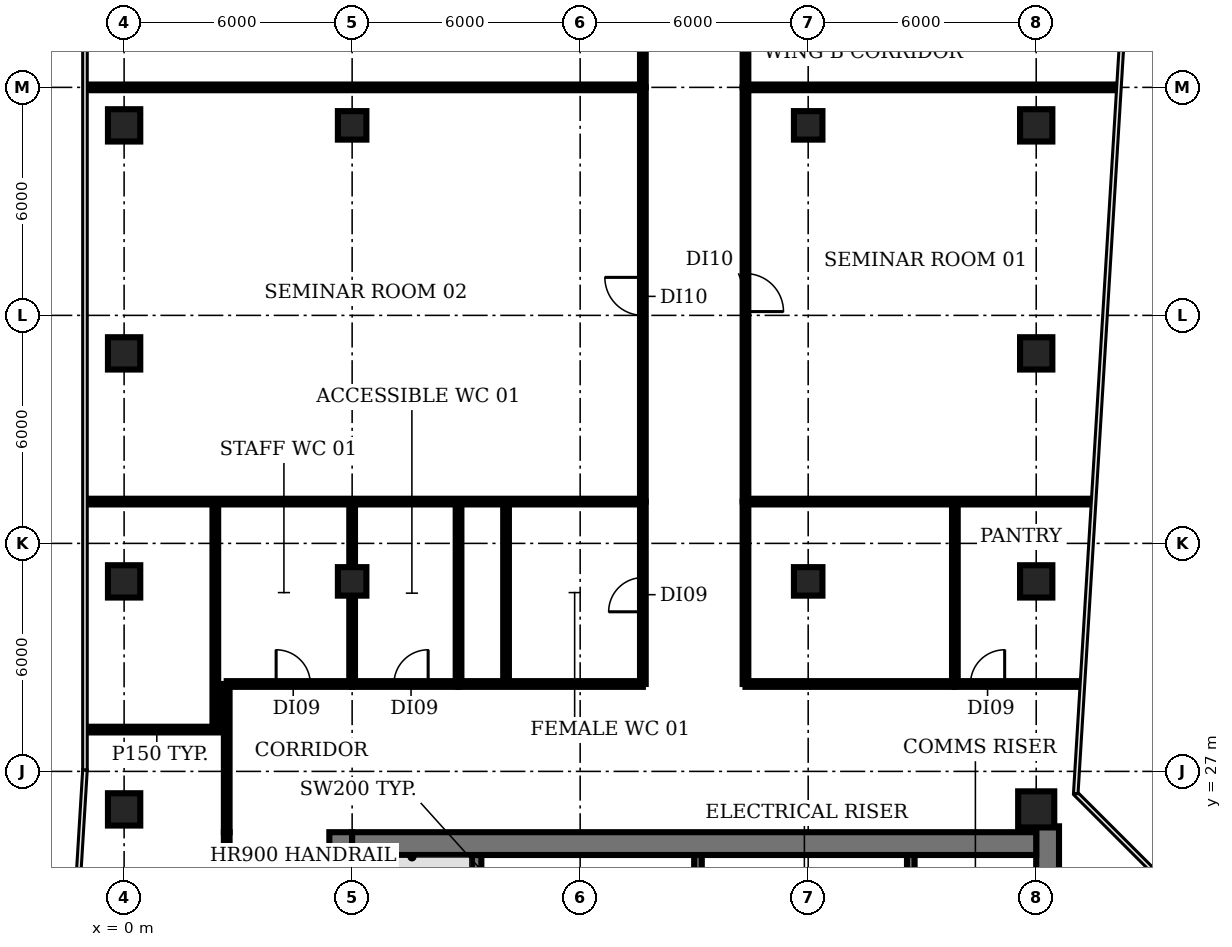
"""IFC4 building model, lengths in metres.
Left out: names, types, materials, properties, quantities, classifications, styles, units other than length and angle.
Written with IfcOpenShell. Run it as: python <this file> out.ifc"""

import sys

from ifc_helpers import new_model, si_unit, direction, frame, frame_2d, origin, origin_2d, place, context, subcontext, project, spatial, rectangle, circle, extrude, element, fill, save


model = new_model("IFC4")
c1 = context("Model", 3, precision=1e-05, world=origin(), true_north=direction((0.0, 1.0)))
c2 = subcontext(c1, "Body", "Model", "MODEL_VIEW")
j1 = project(units=[si_unit("LENGTHUNIT", "METRE"), si_unit("PLANEANGLEUNIT", "RADIAN")], contexts=[c1])
p1 = place(None, origin())
s1 = spatial("IfcSite", under=j1, at=p1, CompositionType="ELEMENT")
p2 = place(p1, origin())
s2 = spatial("IfcBuilding", under=s1, at=p2, CompositionType="ELEMENT")
p3 = place(p2, frame((0.0, 0.0, 155.0)))
s3 = spatial("IfcBuildingStorey", under=s2, at=p3, CompositionType="ELEMENT", Elevation=155.0)
for number, where, z_axis, x_axis in (
    (1, (0.0, 26.0, 0.0), (0.0, 0.0, 1.0), (1.0, 0.0, 0.0)),
    (2, (0.0, 32.0, 0.0), (0.0, 0.0, 1.0), (1.0, 0.0, 0.0)),
    (3, (0.0, 38.0, 0.0), (0.0, 0.0, 1.0), (1.0, 0.0, 0.0)),
    (4, (0.0, 44.0, 0.0), (0.0, 0.0, 1.0), (1.0, 0.0, 0.0)),
):
    element("IfcColumn", number, at=place(p3, frame(where, z_axis=z_axis, x_axis=x_axis)), inside=s3, PredefinedType="COLUMN", context=c2, shape_type="SweptSolid", body=[
        extrude(rectangle(XDim=0.85, YDim=0.85, at=origin_2d()), origin(), (0.0, 0.0, 1.0), 3.85),
    ])
for number, where, z_axis, x_axis in (
    (5, (6.0, 32.0, 0.0), (0.0, 0.0, 1.0), (1.0, 0.0, 0.0)),
    (6, (6.0, 44.0, 0.0), (0.0, 0.0, 1.0), (1.0, 0.0, 0.0)),
    (7, (18.0, 32.0, 0.0), (0.0, 0.0, 1.0), (1.0, 0.0, 0.0)),
    (8, (18.0, 44.0, 0.0), (0.0, 0.0, 1.0), (1.0, 0.0, 0.0)),
):
    element("IfcColumn", number, at=place(p3, frame(where, z_axis=z_axis, x_axis=x_axis)), inside=s3, PredefinedType="COLUMN", context=c2, shape_type="SweptSolid", body=[
        extrude(rectangle(XDim=0.75, YDim=0.75, at=origin_2d()), origin(), (0.0, 0.0, 1.0), 3.85),
    ])
p4 = place(p3, frame((24.0, 26.0, 0.0), z_axis=(0.0, 0.0, 1.0), x_axis=(1.0, 0.0, 0.0)))
e9 = element("IfcColumn", 9, at=p4, inside=s3, PredefinedType="COLUMN", context=c2, shape_type="SweptSolid", body=[
    extrude(circle(Radius=0.475, at=origin_2d()), origin(), (0.0, 0.0, 1.0), 3.85),
])
for number, where, z_axis, x_axis in (
    (10, (24.0, 32.0, 0.0), (0.0, 0.0, 1.0), (1.0, 0.0, 0.0)),
    (11, (24.0, 38.0, 0.0), (0.0, 0.0, 1.0), (1.0, 0.0, 0.0)),
    (12, (24.0, 44.0, 0.0), (0.0, 0.0, 1.0), (1.0, 0.0, 0.0)),
):
    element("IfcColumn", number, at=place(p3, frame(where, z_axis=z_axis, x_axis=x_axis)), inside=s3, PredefinedType="COLUMN", context=c2, shape_type="SweptSolid", body=[
        extrude(rectangle(XDim=0.85, YDim=0.85, at=origin_2d()), origin(), (0.0, 0.0, 1.0), 3.85),
    ])
p5 = place(p3, frame((9.275, 18.375, 0.0), z_axis=(0.0, 0.0, 1.0), x_axis=(0.0, 1.0, 0.0)))
e13 = element("IfcWall", 13, at=p5, inside=s3, PredefinedType="SHEAR", context=c2, shape_type="SweptSolid", body=[
    extrude(rectangle(XDim=6.425, YDim=0.25, at=frame_2d((3.212, 0.0))), origin(), (0.0, 0.0, 1.0), 3.85),
])
for number, where, z_axis, x_axis in (
    (14, (15.1, 22.9, 0.0), (0.0, 0.0, 1.0), (0.0, 1.0, 0.0)),
    (15, (20.7, 22.9, 0.0), (0.0, 0.0, 1.0), (0.0, 1.0, 0.0)),
):
    element("IfcWall", number, at=place(p3, frame(where, z_axis=z_axis, x_axis=x_axis)), inside=s3, PredefinedType="SHEAR", context=c2, shape_type="SweptSolid", body=[
        extrude(rectangle(XDim=1.9, YDim=0.2, at=frame_2d((0.95, 0.0))), origin(), (0.0, 0.0, 1.0), 3.85),
    ])
p6 = place(p3, frame((5.7, 4.8, 0.0), z_axis=(0.0, 0.0, 1.0), x_axis=(0.0, 1.0, 0.0)))
e16 = element("IfcWall", 16, at=p6, inside=s3, PredefinedType="SHEAR", context=c2, shape_type="SweptSolid", body=[
    extrude(rectangle(XDim=20.6, YDim=0.6, at=frame_2d((10.3, 0.0))), origin(), (0.0, 0.0, 1.0), 3.85),
])
p7 = place(p6, frame((0.85, 0.0, 0.0)))
e17 = element("IfcOpeningElement", 17, at=p7, cuts=e16, PredefinedType="OPENING", context=c2, shape_type="SweptSolid", body=[
    extrude(rectangle(XDim=1.5, YDim=2.1, at=frame_2d((0.75, 1.05))), frame((0.0, 0.31, 0.0), z_axis=(0.0, -1.0, 0.0), x_axis=(1.0, 0.0, 0.0)), (0.0, 0.0, 1.0), 0.62),
])
p8 = place(p6, frame((7.3, 0.0, 0.0)))
e18 = element("IfcOpeningElement", 18, at=p8, cuts=e16, PredefinedType="OPENING", context=c2, shape_type="SweptSolid", body=[
    extrude(rectangle(XDim=1.2, YDim=2.1, at=frame_2d((0.6, 1.05))), frame((0.0, 0.31, 0.0), z_axis=(0.0, -1.0, 0.0), x_axis=(1.0, 0.0, 0.0)), (0.0, 0.0, 1.0), 0.62),
])
p9 = place(p6, frame((13.85, 0.0, 0.0)))
e19 = element("IfcOpeningElement", 19, at=p9, cuts=e16, PredefinedType="OPENING", context=c2, shape_type="SweptSolid", body=[
    extrude(rectangle(XDim=1.2, YDim=2.1, at=frame_2d((0.6, 1.05))), frame((0.0, 0.31, 0.0), z_axis=(0.0, -1.0, 0.0), x_axis=(1.0, 0.0, 0.0)), (0.0, 0.0, 1.0), 0.62),
])
p10 = place(p3, frame((24.3, 25.555, 0.0), z_axis=(0.0, 0.0, 1.0), x_axis=(0.0, -1.0, 0.0)))
e20 = element("IfcWall", 20, at=p10, inside=s3, PredefinedType="SHEAR", context=c2, shape_type="SweptSolid", body=[
    extrude(rectangle(XDim=20.755, YDim=0.6, at=frame_2d((10.377, 0.0))), origin(), (0.0, 0.0, 1.0), 3.85),
])
p11 = place(p10, frame((18.405, 0.0, 0.0)))
e21 = element("IfcOpeningElement", 21, at=p11, cuts=e20, PredefinedType="OPENING", context=c2, shape_type="SweptSolid", body=[
    extrude(rectangle(XDim=1.5, YDim=2.1, at=frame_2d((0.75, 1.05))), frame((0.0, 0.31, 0.0), z_axis=(0.0, -1.0, 0.0), x_axis=(1.0, 0.0, 0.0)), (0.0, 0.0, 1.0), 0.62),
])
p12 = place(p10, frame((12.305, 0.0, 0.0)))
e22 = element("IfcOpeningElement", 22, at=p12, cuts=e20, PredefinedType="OPENING", context=c2, shape_type="SweptSolid", body=[
    extrude(rectangle(XDim=0.9, YDim=2.1, at=frame_2d((0.45, 1.05))), frame((0.0, 0.31, 0.0), z_axis=(0.0, -1.0, 0.0), x_axis=(1.0, 0.0, 0.0)), (0.0, 0.0, 1.0), 0.62),
])
p13 = place(p10, frame((6.305, 0.0, 0.0)))
e23 = element("IfcOpeningElement", 23, at=p13, cuts=e20, PredefinedType="OPENING", context=c2, shape_type="SweptSolid", body=[
    extrude(rectangle(XDim=2.0, YDim=2.1, at=frame_2d((1.0, 1.05))), frame((0.0, 0.31, 0.0), z_axis=(0.0, -1.0, 0.0), x_axis=(1.0, 0.0, 0.0)), (0.0, 0.0, 1.0), 0.62),
])
p14 = place(p3, frame((6.0, 25.1, 0.0), z_axis=(0.0, 0.0, 1.0), x_axis=(1.0, 0.0, 0.0)))
e24 = element("IfcWall", 24, at=p14, inside=s3, PredefinedType="SHEAR", context=c2, shape_type="SweptSolid", body=[
    extrude(rectangle(XDim=18.0, YDim=0.6, at=frame_2d((9.0, 0.0))), origin(), (0.0, 0.0, 1.0), 3.85),
])
p15 = place(p3, frame((-0.98, 28.1, 0.0), z_axis=(0.0, 0.0, 1.0), x_axis=(1.0, 0.0, 0.0)))
e25 = element("IfcWall", 25, at=p15, inside=s3, PredefinedType="PARTITIONING", context=c2, shape_type="SweptSolid", body=[
    extrude(rectangle(XDim=3.68, YDim=0.15, at=frame_2d((1.84, 0.0))), origin(), (0.0, 0.0, 1.0), 2.88),
])
p16 = place(p3, frame((-0.98, 34.1, 0.0), z_axis=(0.0, 0.0, 1.0), x_axis=(1.0, 0.0, 0.0)))
e26 = element("IfcWall", 26, at=p16, inside=s3, PredefinedType="PARTITIONING", context=c2, shape_type="SweptSolid", body=[
    extrude(rectangle(XDim=14.63, YDim=0.15, at=frame_2d((7.315, 0.0))), origin(), (0.0, 0.0, 1.0), 2.88),
])
p17 = place(p3, frame((-0.965, 45.0, 0.0), z_axis=(0.0, 0.0, 1.0), x_axis=(1.0, 0.0, 0.0)))
e27 = element("IfcWall", 27, at=p17, inside=s3, PredefinedType="PARTITIONING", context=c2, shape_type="SweptSolid", body=[
    extrude(rectangle(XDim=14.615, YDim=0.15, at=frame_2d((7.308, 0.0))), origin(), (0.0, 0.0, 1.0), 2.88),
])
p18 = place(p3, frame((2.4, 28.1, 0.0), z_axis=(0.0, 0.0, 1.0), x_axis=(0.0, 1.0, 0.0)))
e28 = element("IfcWall", 28, at=p18, inside=s3, PredefinedType="PARTITIONING", context=c2, shape_type="SweptSolid", body=[
    extrude(rectangle(XDim=6.0, YDim=0.15, at=frame_2d((3.0, 0.0))), origin(), (0.0, 0.0, 1.0), 2.88),
])
p19 = place(p3, frame((2.7, 4.8, 0.0), z_axis=(0.0, 0.0, 1.0), x_axis=(0.0, 1.0, 0.0)))
e29 = element("IfcWall", 29, at=p19, inside=s3, PredefinedType="PARTITIONING", context=c2, shape_type="SweptSolid", body=[
    extrude(rectangle(XDim=20.6, YDim=0.15, at=frame_2d((10.3, 0.0))), origin(), (0.0, 0.0, 1.0), 2.88),
])
p20 = place(p19, frame((10.2, 0.0, 0.0)))
e30 = element("IfcOpeningElement", 30, at=p20, cuts=e29, PredefinedType="OPENING", context=c2, shape_type="SweptSolid", body=[
    extrude(rectangle(XDim=1.2, YDim=2.1, at=frame_2d((0.6, 1.05))), frame((0.0, 0.085, 0.0), z_axis=(0.0, -1.0, 0.0), x_axis=(1.0, 0.0, 0.0)), (0.0, 0.0, 1.0), 0.17),
])
p21 = place(p3, frame((2.7, 25.4, 0.0), z_axis=(0.0, 0.0, 1.0), x_axis=(0.0, 1.0, 0.0)))
e31 = element("IfcWall", 31, at=p21, inside=s3, PredefinedType="PARTITIONING", context=c2, shape_type="SweptSolid", body=[
    extrude(rectangle(XDim=3.9, YDim=0.15, at=frame_2d((1.95, 0.0))), origin(), (0.0, 0.0, 1.0), 2.88),
])
p22 = place(p3, frame((2.7, 29.3, 0.0), z_axis=(0.0, 0.0, 1.0), x_axis=(1.0, 0.0, 0.0)))
e32 = element("IfcWall", 32, at=p22, inside=s3, PredefinedType="PARTITIONING", context=c2, shape_type="SweptSolid", body=[
    extrude(rectangle(XDim=3.3, YDim=0.15, at=frame_2d((1.65, 0.0))), origin(), (0.0, 0.0, 1.0), 2.88),
])
p23 = place(p22, frame((1.3, 0.0, 0.0)))
e33 = element("IfcOpeningElement", 33, at=p23, cuts=e32, PredefinedType="OPENING", context=c2, shape_type="SweptSolid", body=[
    extrude(rectangle(XDim=0.9, YDim=2.1, at=frame_2d((0.45, 1.05))), frame((0.0, 0.085, 0.0), z_axis=(0.0, -1.0, 0.0), x_axis=(1.0, 0.0, 0.0)), (0.0, 0.0, 1.0), 0.17),
])
p24 = place(p3, frame((6.0, 29.3, 0.0), z_axis=(0.0, 0.0, 1.0), x_axis=(0.0, 1.0, 0.0)))
e34 = element("IfcWall", 34, at=p24, inside=s3, PredefinedType="PARTITIONING", context=c2, shape_type="SweptSolid", body=[
    extrude(rectangle(XDim=4.8, YDim=0.15, at=frame_2d((2.4, 0.0))), origin(), (0.0, 0.0, 1.0), 2.88),
])
p25 = place(p3, frame((6.0, 29.3, 0.0), z_axis=(0.0, 0.0, 1.0), x_axis=(1.0, 0.0, 0.0)))
e35 = element("IfcWall", 35, at=p25, inside=s3, PredefinedType="PARTITIONING", context=c2, shape_type="SweptSolid", body=[
    extrude(rectangle(XDim=2.8, YDim=0.15, at=frame_2d((1.4, 0.0))), origin(), (0.0, 0.0, 1.0), 2.88),
])
p26 = place(p25, frame((1.1, 0.0, 0.0)))
e36 = element("IfcOpeningElement", 36, at=p26, cuts=e35, PredefinedType="OPENING", context=c2, shape_type="SweptSolid", body=[
    extrude(rectangle(XDim=0.9, YDim=2.1, at=frame_2d((0.45, 1.05))), frame((0.0, 0.085, 0.0), z_axis=(0.0, -1.0, 0.0), x_axis=(1.0, 0.0, 0.0)), (0.0, 0.0, 1.0), 0.17),
])
p27 = place(p3, frame((8.8, 29.3, 0.0), z_axis=(0.0, 0.0, 1.0), x_axis=(0.0, 1.0, 0.0)))
e37 = element("IfcWall", 37, at=p27, inside=s3, PredefinedType="PARTITIONING", context=c2, shape_type="SweptSolid", body=[
    extrude(rectangle(XDim=4.8, YDim=0.15, at=frame_2d((2.4, 0.0))), origin(), (0.0, 0.0, 1.0), 2.88),
])
p28 = place(p3, frame((8.8, 29.3, 0.0), z_axis=(0.0, 0.0, 1.0), x_axis=(1.0, 0.0, 0.0)))
e38 = element("IfcWall", 38, at=p28, inside=s3, PredefinedType="PARTITIONING", context=c2, shape_type="SweptSolid", body=[
    extrude(rectangle(XDim=4.85, YDim=0.15, at=frame_2d((2.425, 0.0))), origin(), (0.0, 0.0, 1.0), 2.88),
])
p29 = place(p3, frame((10.05, 29.3, 0.0), z_axis=(0.0, 0.0, 1.0), x_axis=(0.0, 1.0, 0.0)))
e39 = element("IfcWall", 39, at=p29, inside=s3, PredefinedType="PARTITIONING", context=c2, shape_type="SweptSolid", body=[
    extrude(rectangle(XDim=4.8, YDim=0.15, at=frame_2d((2.4, 0.0))), origin(), (0.0, 0.0, 1.0), 2.88),
])
p30 = place(p3, frame((13.65, 29.3, 0.0), z_axis=(0.0, 0.0, 1.0), x_axis=(0.0, 1.0, 0.0)))
e40 = element("IfcWall", 40, at=p30, inside=s3, PredefinedType="PARTITIONING", context=c2, shape_type="SweptSolid", body=[
    extrude(rectangle(XDim=4.8, YDim=0.15, at=frame_2d((2.4, 0.0))), origin(), (0.0, 0.0, 1.0), 2.88),
])
p31 = place(p30, frame((1.9, 0.0, 0.0)))
e41 = element("IfcOpeningElement", 41, at=p31, cuts=e40, PredefinedType="OPENING", context=c2, shape_type="SweptSolid", body=[
    extrude(rectangle(XDim=0.9, YDim=2.1, at=frame_2d((0.45, 1.05))), frame((0.0, 0.085, 0.0), z_axis=(0.0, -1.0, 0.0), x_axis=(1.0, 0.0, 0.0)), (0.0, 0.0, 1.0), 0.17),
])
p32 = place(p3, frame((13.65, 34.1, 0.0), z_axis=(0.0, 0.0, 1.0), x_axis=(0.0, 1.0, 0.0)))
e42 = element("IfcWall", 42, at=p32, inside=s3, PredefinedType="PARTITIONING", context=c2, shape_type="SweptSolid", body=[
    extrude(rectangle(XDim=10.9, YDim=0.15, at=frame_2d((5.45, 0.0))), origin(), (0.0, 0.0, 1.0), 2.88),
])
p33 = place(p32, frame((4.9, 0.0, 0.0)))
e43 = element("IfcOpeningElement", 43, at=p33, cuts=e42, PredefinedType="OPENING", context=c2, shape_type="SweptSolid", body=[
    extrude(rectangle(XDim=1.0, YDim=2.1, at=frame_2d((0.5, 1.05))), frame((0.0, 0.085, 0.0), z_axis=(0.0, -1.0, 0.0), x_axis=(1.0, 0.0, 0.0)), (0.0, 0.0, 1.0), 0.17),
])
p34 = place(p3, frame((13.65, 45.0, 0.0), z_axis=(0.0, 0.0, 1.0), x_axis=(0.0, 1.0, 0.0)))
e44 = element("IfcWall", 44, at=p34, inside=s3, PredefinedType="PARTITIONING", context=c2, shape_type="SweptSolid", body=[
    extrude(rectangle(XDim=6.0, YDim=0.15, at=frame_2d((3.0, 0.0))), origin(), (0.0, 0.0, 1.0), 2.88),
])
p35 = place(p34, frame((2.4, 0.0, 0.0)))
e45 = element("IfcOpeningElement", 45, at=p35, cuts=e44, PredefinedType="OPENING", context=c2, shape_type="SweptSolid", body=[
    extrude(rectangle(XDim=1.0, YDim=2.1, at=frame_2d((0.5, 1.05))), frame((0.0, 0.085, 0.0), z_axis=(0.0, -1.0, 0.0), x_axis=(1.0, 0.0, 0.0)), (0.0, 0.0, 1.0), 0.17),
])
p36 = place(p3, frame((16.35, 29.3, 0.0), z_axis=(0.0, 0.0, 1.0), x_axis=(0.0, 1.0, 0.0)))
e46 = element("IfcWall", 46, at=p36, inside=s3, PredefinedType="PARTITIONING", context=c2, shape_type="SweptSolid", body=[
    extrude(rectangle(XDim=4.8, YDim=0.15, at=frame_2d((2.4, 0.0))), origin(), (0.0, 0.0, 1.0), 2.88),
])
p37 = place(p3, frame((16.35, 29.3, 0.0), z_axis=(0.0, 0.0, 1.0), x_axis=(1.0, 0.0, 0.0)))
e47 = element("IfcWall", 47, at=p37, inside=s3, PredefinedType="PARTITIONING", context=c2, shape_type="SweptSolid", body=[
    extrude(rectangle(XDim=5.51, YDim=0.15, at=frame_2d((2.755, 0.0))), origin(), (0.0, 0.0, 1.0), 2.88),
])
p38 = place(p3, frame((16.35, 34.1, 0.0), z_axis=(0.0, 0.0, 1.0), x_axis=(1.0, 0.0, 0.0)))
e48 = element("IfcWall", 48, at=p38, inside=s3, PredefinedType="PARTITIONING", context=c2, shape_type="SweptSolid", body=[
    extrude(rectangle(XDim=9.11, YDim=0.15, at=frame_2d((4.555, 0.0))), origin(), (0.0, 0.0, 1.0), 2.88),
])
p39 = place(p3, frame((16.35, 45.0, 0.0), z_axis=(0.0, 0.0, 1.0), x_axis=(0.0, -1.0, 0.0)))
e49 = element("IfcWall", 49, at=p39, inside=s3, PredefinedType="PARTITIONING", context=c2, shape_type="SweptSolid", body=[
    extrude(rectangle(XDim=10.9, YDim=0.15, at=frame_2d((5.45, 0.0))), origin(), (0.0, 0.0, 1.0), 2.88),
])
p40 = place(p39, frame((4.9, 0.0, 0.0)))
e50 = element("IfcOpeningElement", 50, at=p40, cuts=e49, PredefinedType="OPENING", context=c2, shape_type="SweptSolid", body=[
    extrude(rectangle(XDim=1.0, YDim=2.1, at=frame_2d((0.5, 1.05))), frame((0.0, 0.085, 0.0), z_axis=(0.0, -1.0, 0.0), x_axis=(1.0, 0.0, 0.0)), (0.0, 0.0, 1.0), 0.17),
])
p41 = place(p3, frame((16.35, 45.0, 0.0), z_axis=(0.0, 0.0, 1.0), x_axis=(1.0, 0.0, 0.0)))
e51 = element("IfcWall", 51, at=p41, inside=s3, PredefinedType="PARTITIONING", context=c2, shape_type="SweptSolid", body=[
    extrude(rectangle(XDim=9.78, YDim=0.15, at=frame_2d((4.89, 0.0))), origin(), (0.0, 0.0, 1.0), 2.88),
])
p42 = place(p3, frame((16.35, 51.0, 0.0), z_axis=(0.0, 0.0, 1.0), x_axis=(0.0, -1.0, 0.0)))
e52 = element("IfcWall", 52, at=p42, inside=s3, PredefinedType="PARTITIONING", context=c2, shape_type="SweptSolid", body=[
    extrude(rectangle(XDim=6.0, YDim=0.15, at=frame_2d((3.0, 0.0))), origin(), (0.0, 0.0, 1.0), 2.88),
])
p43 = place(p42, frame((2.4, 0.0, 0.0)))
e53 = element("IfcOpeningElement", 53, at=p43, cuts=e52, PredefinedType="OPENING", context=c2, shape_type="SweptSolid", body=[
    extrude(rectangle(XDim=1.0, YDim=2.1, at=frame_2d((0.5, 1.05))), frame((0.0, 0.085, 0.0), z_axis=(0.0, -1.0, 0.0), x_axis=(1.0, 0.0, 0.0)), (0.0, 0.0, 1.0), 0.17),
])
p44 = place(p3, frame((21.86, 29.3, 0.0), z_axis=(0.0, 0.0, 1.0), x_axis=(0.0, 1.0, 0.0)))
e54 = element("IfcWall", 54, at=p44, inside=s3, PredefinedType="PARTITIONING", context=c2, shape_type="SweptSolid", body=[
    extrude(rectangle(XDim=4.8, YDim=0.15, at=frame_2d((2.4, 0.0))), origin(), (0.0, 0.0, 1.0), 2.88),
])
p45 = place(p3, frame((21.86, 29.3, 0.0), z_axis=(0.0, 0.0, 1.0), x_axis=(1.0, 0.0, 0.0)))
e55 = element("IfcWall", 55, at=p45, inside=s3, PredefinedType="PARTITIONING", context=c2, shape_type="SweptSolid", body=[
    extrude(rectangle(XDim=3.31, YDim=0.15, at=frame_2d((1.655, 0.0))), origin(), (0.0, 0.0, 1.0), 2.88),
])
p46 = place(p45, frame((0.41, 0.0, 0.0)))
e56 = element("IfcOpeningElement", 56, at=p46, cuts=e55, PredefinedType="OPENING", context=c2, shape_type="SweptSolid", body=[
    extrude(rectangle(XDim=0.9, YDim=2.1, at=frame_2d((0.45, 1.05))), frame((0.0, 0.085, 0.0), z_axis=(0.0, -1.0, 0.0), x_axis=(1.0, 0.0, 0.0)), (0.0, 0.0, 1.0), 0.17),
])
p47 = place(p23, origin())
e57 = element("IfcDoor", 57, at=p47, inside=s3, OperationType="SINGLE_SWING_LEFT", PredefinedType="DOOR", context=c2, shape_type="SweptSolid", body=[
    extrude(rectangle(XDim=0.9, YDim=2.1, at=frame_2d((0.45, 1.05))), frame((0.0, 0.025, 0.0), z_axis=(0.0, -1.0, 0.0), x_axis=(1.0, 0.0, 0.0)), (0.0, 0.0, 1.0), 0.05),
])
fill(e33, e57)
p48 = place(p26, origin())
e58 = element("IfcDoor", 58, at=p48, inside=s3, OperationType="SINGLE_SWING_RIGHT", PredefinedType="DOOR", context=c2, shape_type="SweptSolid", body=[
    extrude(rectangle(XDim=0.9, YDim=2.1, at=frame_2d((0.45, 1.05))), frame((0.0, 0.025, 0.0), z_axis=(0.0, -1.0, 0.0), x_axis=(1.0, 0.0, 0.0)), (0.0, 0.0, 1.0), 0.05),
])
fill(e36, e58)
p49 = place(p31, origin())
e59 = element("IfcDoor", 59, at=p49, inside=s3, OperationType="SINGLE_SWING_LEFT", PredefinedType="DOOR", context=c2, shape_type="SweptSolid", body=[
    extrude(rectangle(XDim=0.9, YDim=2.1, at=frame_2d((0.45, 1.05))), frame((0.0, 0.025, 0.0), z_axis=(0.0, -1.0, 0.0), x_axis=(1.0, 0.0, 0.0)), (0.0, 0.0, 1.0), 0.05),
])
fill(e41, e59)
p50 = place(p33, origin())
e60 = element("IfcDoor", 60, at=p50, inside=s3, OperationType="SINGLE_SWING_RIGHT", PredefinedType="DOOR", context=c2, shape_type="SweptSolid", body=[
    extrude(rectangle(XDim=1.0, YDim=2.1, at=frame_2d((0.5, 1.05))), frame((0.0, 0.025, 0.0), z_axis=(0.0, -1.0, 0.0), x_axis=(1.0, 0.0, 0.0)), (0.0, 0.0, 1.0), 0.05),
])
fill(e43, e60)
p51 = place(p40, origin())
e61 = element("IfcDoor", 61, at=p51, inside=s3, OperationType="SINGLE_SWING_RIGHT", PredefinedType="DOOR", context=c2, shape_type="SweptSolid", body=[
    extrude(rectangle(XDim=1.0, YDim=2.1, at=frame_2d((0.5, 1.05))), frame((0.0, 0.025, 0.0), z_axis=(0.0, -1.0, 0.0), x_axis=(1.0, 0.0, 0.0)), (0.0, 0.0, 1.0), 0.05),
])
fill(e50, e61)
p52 = place(p46, origin())
e62 = element("IfcDoor", 62, at=p52, inside=s3, OperationType="SINGLE_SWING_RIGHT", PredefinedType="DOOR", context=c2, shape_type="SweptSolid", body=[
    extrude(rectangle(XDim=0.9, YDim=2.1, at=frame_2d((0.45, 1.05))), frame((0.0, 0.025, 0.0), z_axis=(0.0, -1.0, 0.0), x_axis=(1.0, 0.0, 0.0)), (0.0, 0.0, 1.0), 0.05),
])
fill(e56, e62)
save(model, sys.argv[1])
